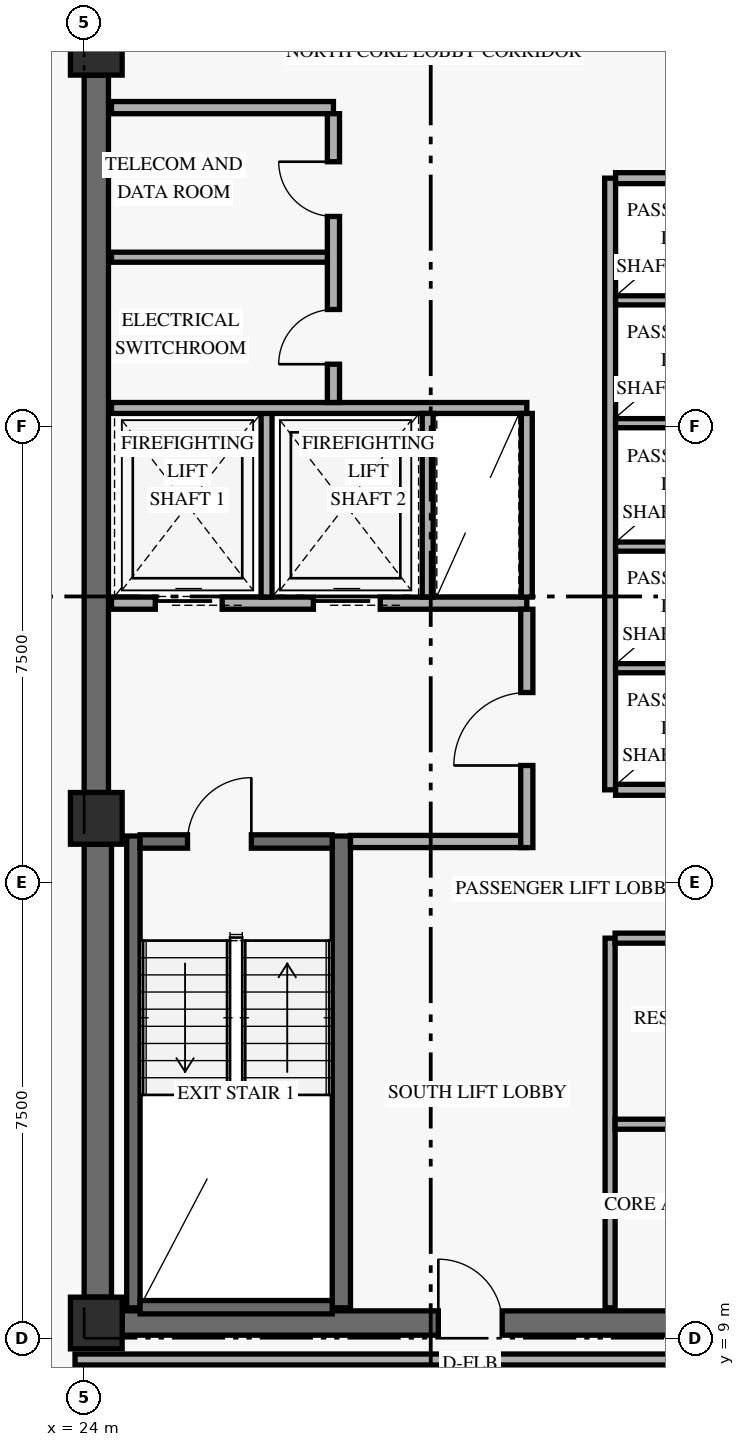
"""IFC4 building model, lengths in metres.
Left out: names, types, materials, properties, quantities, classifications, styles, units other than length and angle.
Written with IfcOpenShell. Run it as: python <this file> out.ifc"""

import sys

from ifc_helpers import new_model, si_unit, direction, frame, frame_2d, origin, origin_2d, place, context, subcontext, project, spatial, rectangle, extrude, element, fill, save


model = new_model("IFC4")
c1 = context("Model", 3, precision=1e-05, world=origin(), true_north=direction((0.0, 1.0)))
c2 = subcontext(c1, "Body", "Model", "MODEL_VIEW")
j1 = project(units=[si_unit("LENGTHUNIT", "METRE"), si_unit("PLANEANGLEUNIT", "RADIAN")], contexts=[c1])
p1 = place(None, origin())
s1 = spatial("IfcSite", under=j1, at=p1, CompositionType="ELEMENT")
p2 = place(p1, origin())
s2 = spatial("IfcBuilding", under=s1, at=p2, CompositionType="ELEMENT")
p3 = place(p2, frame((0.0, 0.0, 132.0)))
s3 = spatial("IfcBuildingStorey", under=s2, at=p3, CompositionType="ELEMENT", Elevation=132.0)
p4 = place(p3, frame((24.225, 9.675, 0.0), z_axis=(0.0, 0.0, 1.0), x_axis=(0.0, 1.0, 0.0)))
e1 = element("IfcWall", 1, at=p4, inside=s3, PredefinedType="SHEAR", context=c2, shape_type="SweptSolid", body=[
    extrude(rectangle(XDim=7.45, YDim=0.45, at=frame_2d((3.725, 0.0))), origin(), (0.0, 0.0, 1.0), 2.689),
])
p5 = place(p3, frame((24.2, 17.975, 0.0), z_axis=(0.0, 0.0, 1.0), x_axis=(0.0, 1.0, 0.0)))
e2 = element("IfcWall", 2, at=p5, inside=s3, PredefinedType="SHEAR", context=c2, shape_type="SweptSolid", body=[
    extrude(rectangle(XDim=11.8, YDim=0.4, at=frame_2d((5.9, 0.0))), origin(), (0.0, 0.0, 1.0), 2.689),
])
p6 = place(p3, frame((24.625, 9.25, 0.0), z_axis=(0.0, 0.0, 1.0), x_axis=(1.0, 0.0, 0.0)))
e3 = element("IfcWall", 3, at=p6, inside=s3, PredefinedType="SHEAR", context=c2, shape_type="SweptSolid", body=[
    extrude(rectangle(XDim=10.15, YDim=0.4, at=frame_2d((5.075, 0.0))), origin(), (0.0, 0.0, 1.0), 3.3),
])
p7 = place(p6, frame((5.2, 0.0, 0.0)))
e4 = element("IfcOpeningElement", 4, at=p7, cuts=e3, PredefinedType="OPENING", context=c2, shape_type="SweptSolid", body=[
    extrude(rectangle(XDim=1.05, YDim=2.15, at=frame_2d((0.525, 1.075))), frame((0.0, 0.21, 0.0), z_axis=(0.0, -1.0, 0.0), x_axis=(1.0, 0.0, 0.0)), (0.0, 0.0, 1.0), 0.42),
])
p8 = place(p3, frame((24.81, 9.5, 0.0), z_axis=(0.0, 0.0, 1.0), x_axis=(0.0, 1.0, 0.0)))
e5 = element("IfcWall", 5, at=p8, inside=s3, PredefinedType="SHEAR", context=c2, shape_type="SweptSolid", body=[
    extrude(rectangle(XDim=7.76, YDim=0.22, at=frame_2d((3.88, 0.0))), origin(), (0.0, 0.0, 1.0), 3.3),
])
p9 = place(p3, frame((28.23, 9.5, 0.0), z_axis=(0.0, 0.0, 1.0), x_axis=(0.0, 1.0, 0.0)))
e6 = element("IfcWall", 6, at=p9, inside=s3, PredefinedType="SHEAR", context=c2, shape_type="SweptSolid", body=[
    extrude(rectangle(XDim=7.76, YDim=0.3, at=frame_2d((3.88, 0.0))), origin(), (0.0, 0.0, 1.0), 3.3),
])
p10 = place(p3, frame((24.92, 9.51, 0.0), z_axis=(0.0, 0.0, 1.0), x_axis=(1.0, 0.0, 0.0)))
e7 = element("IfcWall", 7, at=p10, inside=s3, PredefinedType="SHEAR", context=c2, shape_type="SweptSolid", body=[
    extrude(rectangle(XDim=3.16, YDim=0.22, at=frame_2d((1.58, 0.0))), origin(), (0.0, 0.0, 1.0), 3.3),
])
p11 = place(p3, frame((24.92, 17.17, 0.0), z_axis=(0.0, 0.0, 1.0), x_axis=(1.0, 0.0, 0.0)))
e8 = element("IfcWall", 8, at=p11, inside=s3, PredefinedType="SHEAR", context=c2, shape_type="SweptSolid", body=[
    extrude(rectangle(XDim=3.16, YDim=0.22, at=frame_2d((1.58, 0.0))), origin(), (0.0, 0.0, 1.0), 3.3),
])
p12 = place(p11, frame((0.78, 0.0, 0.0)))
e9 = element("IfcOpeningElement", 9, at=p12, cuts=e8, PredefinedType="OPENING", context=c2, shape_type="SweptSolid", body=[
    extrude(rectangle(XDim=1.05, YDim=2.15, at=frame_2d((0.525, 1.075))), frame((0.0, 0.12, 0.0), z_axis=(0.0, -1.0, 0.0), x_axis=(1.0, 0.0, 0.0)), (0.0, 0.0, 1.0), 0.24),
])
for number, where, z_axis, x_axis in (
    (10, (24.2, 9.25, 0.0), (0.0, 0.0, 1.0), (1.0, 0.0, 0.0)),
    (11, (24.2, 17.55, 0.0), (0.0, 0.0, 1.0), (1.0, 0.0, 0.0)),
    (12, (24.2, 30.2, 0.0), (0.0, 0.0, 1.0), (1.0, 0.0, 0.0)),
):
    element("IfcColumn", number, at=place(p3, frame(where, z_axis=z_axis, x_axis=x_axis)), inside=s3, PredefinedType="COLUMN", context=c2, shape_type="SweptSolid", body=[
        extrude(rectangle(XDim=0.85, YDim=0.85, at=origin_2d()), origin(), (0.0, 0.0, 1.0), 3.6),
    ])
p13 = place(p3, frame((24.45, 21.09, 0.0), z_axis=(0.0, 0.0, 1.0), x_axis=(1.0, 0.0, 0.0)))
e13 = element("IfcWall", 13, at=p13, inside=s3, PredefinedType="STANDARD", context=c2, shape_type="SweptSolid", body=[
    extrude(rectangle(XDim=6.83, YDim=0.2, at=frame_2d((3.415, 0.0))), origin(), (0.0, 0.0, 1.0), 3.3),
])
p14 = place(p13, frame((0.72, 0.0, 0.0)))
e14 = element("IfcOpeningElement", 14, at=p14, cuts=e13, PredefinedType="OPENING", context=c2, shape_type="SweptSolid", body=[
    extrude(rectangle(XDim=1.1, YDim=2.2, at=frame_2d((0.55, 1.1))), frame((0.0, 0.11, 0.0), z_axis=(0.0, -1.0, 0.0), x_axis=(1.0, 0.0, 0.0)), (0.0, 0.0, 1.0), 0.22),
])
p15 = place(p13, frame((3.32, 0.0, 0.0)))
e15 = element("IfcOpeningElement", 15, at=p15, cuts=e13, PredefinedType="OPENING", context=c2, shape_type="SweptSolid", body=[
    extrude(rectangle(XDim=1.1, YDim=2.2, at=frame_2d((0.55, 1.1))), frame((0.0, 0.11, 0.0), z_axis=(0.0, -1.0, 0.0), x_axis=(1.0, 0.0, 0.0)), (0.0, 0.0, 1.0), 0.22),
])
p16 = place(p3, frame((28.38, 17.17, 0.0), z_axis=(0.0, 0.0, 1.0), x_axis=(1.0, 0.0, 0.0)))
e16 = element("IfcWall", 16, at=p16, inside=s3, PredefinedType="STANDARD", context=c2, shape_type="SweptSolid", body=[
    extrude(rectangle(XDim=2.9, YDim=0.2, at=frame_2d((1.45, 0.0))), origin(), (0.0, 0.0, 1.0), 3.3),
])
p17 = place(p3, frame((31.28, 17.07, 0.0), z_axis=(0.0, 0.0, 1.0), x_axis=(0.0, 1.0, 0.0)))
e17 = element("IfcWall", 17, at=p17, inside=s3, PredefinedType="STANDARD", context=c2, shape_type="SweptSolid", body=[
    extrude(rectangle(XDim=3.92, YDim=0.2, at=frame_2d((1.96, 0.0))), origin(), (0.0, 0.0, 1.0), 2.671),
])
p18 = place(p17, frame((1.35, 0.0, 0.0)))
e18 = element("IfcOpeningElement", 18, at=p18, cuts=e17, PredefinedType="OPENING", context=c2, shape_type="SweptSolid", body=[
    extrude(rectangle(XDim=1.2, YDim=2.15, at=frame_2d((0.6, 1.075))), frame((0.0, 0.11, 0.0), z_axis=(0.0, -1.0, 0.0), x_axis=(1.0, 0.0, 0.0)), (0.0, 0.0, 1.0), 0.22),
])
p19 = place(p3, frame((27.0, 21.19, 0.0), z_axis=(0.0, 0.0, 1.0), x_axis=(0.0, 1.0, 0.0)))
e19 = element("IfcWall", 19, at=p19, inside=s3, PredefinedType="STANDARD", context=c2, shape_type="SweptSolid", body=[
    extrude(rectangle(XDim=3.11, YDim=0.18, at=frame_2d((1.555, 0.0))), origin(), (0.0, 0.0, 1.0), 3.3),
])
p20 = place(p3, frame((24.45, 24.3, 0.0), z_axis=(0.0, 0.0, 1.0), x_axis=(1.0, 0.0, 0.0)))
e20 = element("IfcWall", 20, at=p20, inside=s3, PredefinedType="STANDARD", context=c2, shape_type="SweptSolid", body=[
    extrude(rectangle(XDim=6.83, YDim=0.18, at=frame_2d((3.415, 0.0))), origin(), (0.0, 0.0, 1.0), 3.3),
])
for number, where, z_axis, x_axis in (
    (21, (29.65, 21.19, 0.0), (0.0, 0.0, 1.0), (0.0, 1.0, 0.0)),
    (22, (31.28, 21.19, 0.0), (0.0, 0.0, 1.0), (0.0, 1.0, 0.0)),
):
    element("IfcWall", number, at=place(p3, frame(where, z_axis=z_axis, x_axis=x_axis)), inside=s3, PredefinedType="STANDARD", context=c2, shape_type="SweptSolid", body=[
        extrude(rectangle(XDim=3.02, YDim=0.18, at=frame_2d((1.51, 0.0))), origin(), (0.0, 0.0, 1.0), 3.3),
    ])
p21 = place(p3, frame((24.45, 29.24, 0.0), z_axis=(0.0, 0.0, 1.0), x_axis=(1.0, 0.0, 0.0)))
e23 = element("IfcWall", 23, at=p21, inside=s3, PredefinedType="STANDARD", context=c2, shape_type="SweptSolid", body=[
    extrude(rectangle(XDim=3.65, YDim=0.2, at=frame_2d((1.825, 0.0))), origin(), (0.0, 0.0, 1.0), 3.3),
])
p22 = place(p3, frame((28.1, 24.39, 0.0), z_axis=(0.0, 0.0, 1.0), x_axis=(0.0, 1.0, 0.0)))
e24 = element("IfcWall", 24, at=p22, inside=s3, PredefinedType="STANDARD", context=c2, shape_type="SweptSolid", body=[
    extrude(rectangle(XDim=4.75, YDim=0.2, at=frame_2d((2.375, 0.0))), origin(), (0.0, 0.0, 1.0), 3.3),
])
p23 = place(p22, frame((0.63, 0.0, 0.0)))
e25 = element("IfcOpeningElement", 25, at=p23, cuts=e24, PredefinedType="OPENING", context=c2, shape_type="SweptSolid", body=[
    extrude(rectangle(XDim=0.9, YDim=2.1, at=frame_2d((0.45, 1.05))), frame((0.0, 0.11, 0.0), z_axis=(0.0, -1.0, 0.0), x_axis=(1.0, 0.0, 0.0)), (0.0, 0.0, 1.0), 0.22),
])
p24 = place(p22, frame((3.06, 0.0, 0.0)))
e26 = element("IfcOpeningElement", 26, at=p24, cuts=e24, PredefinedType="OPENING", context=c2, shape_type="SweptSolid", body=[
    extrude(rectangle(XDim=0.9, YDim=2.1, at=frame_2d((0.45, 1.05))), frame((0.0, 0.11, 0.0), z_axis=(0.0, -1.0, 0.0), x_axis=(1.0, 0.0, 0.0)), (0.0, 0.0, 1.0), 0.22),
])
p25 = place(p3, frame((24.45, 26.78, 0.0), z_axis=(0.0, 0.0, 1.0), x_axis=(1.0, 0.0, 0.0)))
e27 = element("IfcWall", 27, at=p25, inside=s3, PredefinedType="PARTITIONING", context=c2, shape_type="SweptSolid", body=[
    extrude(rectangle(XDim=3.55, YDim=0.165, at=frame_2d((1.775, 0.0))), origin(), (0.0, 0.0, 1.0), 3.3),
])
p26 = place(p3, frame((32.65, 18.02, 0.0), z_axis=(0.0, 0.0, 1.0), x_axis=(0.0, 1.0, 0.0)))
e28 = element("IfcWall", 28, at=p26, inside=s3, PredefinedType="STANDARD", context=c2, shape_type="SweptSolid", body=[
    extrude(rectangle(XDim=10.06, YDim=0.18, at=frame_2d((5.03, 0.0))), origin(), (0.0, 0.0, 1.0), 3.3),
])
for number, where, z_axis, x_axis in (
    (29, (32.74, 18.02, 0.0), (0.0, 0.0, 1.0), (1.0, 0.0, 0.0)),
    (30, (32.74, 28.08, 0.0), (0.0, 0.0, 1.0), (1.0, 0.0, 0.0)),
):
    element("IfcWall", number, at=place(p3, frame(where, z_axis=z_axis, x_axis=x_axis)), inside=s3, PredefinedType="STANDARD", context=c2, shape_type="SweptSolid", body=[
        extrude(rectangle(XDim=2.26, YDim=0.18, at=frame_2d((1.13, 0.0))), origin(), (0.0, 0.0, 1.0), 3.3),
    ])
for number, where, z_axis, x_axis in (
    (31, (32.74, 20.02, 0.0), (0.0, 0.0, 1.0), (1.0, 0.0, 0.0)),
    (32, (32.74, 22.02, 0.0), (0.0, 0.0, 1.0), (1.0, 0.0, 0.0)),
    (33, (32.74, 24.05, 0.0), (0.0, 0.0, 1.0), (1.0, 0.0, 0.0)),
    (34, (32.74, 26.07, 0.0), (0.0, 0.0, 1.0), (1.0, 0.0, 0.0)),
):
    element("IfcWall", number, at=place(p3, frame(where, z_axis=z_axis, x_axis=x_axis)), inside=s3, PredefinedType="STANDARD", context=c2, shape_type="SweptSolid", body=[
        extrude(rectangle(XDim=2.26, YDim=0.15, at=frame_2d((1.13, 0.0))), origin(), (0.0, 0.0, 1.0), 3.3),
    ])
p27 = place(p3, frame((32.65, 9.5, 0.0), z_axis=(0.0, 0.0, 1.0), x_axis=(0.0, 1.0, 0.0)))
e35 = element("IfcWall", 35, at=p27, inside=s3, PredefinedType="PARTITIONING", context=c2, shape_type="SweptSolid", body=[
    extrude(rectangle(XDim=6.08, YDim=0.165, at=frame_2d((3.04, 0.0))), origin(), (0.0, 0.0, 1.0), 3.3),
])
p28 = place(p3, frame((32.732, 15.58, 0.0), z_axis=(0.0, 0.0, 1.0), x_axis=(1.0, 0.0, 0.0)))
e36 = element("IfcWall", 36, at=p28, inside=s3, PredefinedType="PARTITIONING", context=c2, shape_type="SweptSolid", body=[
    extrude(rectangle(XDim=4.818, YDim=0.165, at=frame_2d((2.409, 0.0))), origin(), (0.0, 0.0, 1.0), 2.671),
])
p29 = place(p28, frame((2.867, 0.0, 0.0)))
e37 = element("IfcOpeningElement", 37, at=p29, cuts=e36, PredefinedType="OPENING", context=c2, shape_type="SweptSolid", body=[
    extrude(rectangle(XDim=0.95, YDim=2.15, at=frame_2d((0.475, 1.075))), frame((0.0, 0.093, 0.0), z_axis=(0.0, -1.0, 0.0), x_axis=(1.0, 0.0, 0.0)), (0.0, 0.0, 1.0), 0.185),
])
p30 = place(p3, frame((32.732, 12.52, 0.0), z_axis=(0.0, 0.0, 1.0), x_axis=(1.0, 0.0, 0.0)))
e38 = element("IfcWall", 38, at=p30, inside=s3, PredefinedType="PARTITIONING", context=c2, shape_type="SweptSolid", body=[
    extrude(rectangle(XDim=4.735, YDim=0.165, at=frame_2d((2.368, 0.0))), origin(), (0.0, 0.0, 1.0), 2.671),
])
p31 = place(p30, frame((2.768, 0.0, 0.0)))
e39 = element("IfcOpeningElement", 39, at=p31, cuts=e38, PredefinedType="OPENING", context=c2, shape_type="SweptSolid", body=[
    extrude(rectangle(XDim=0.9, YDim=2.1, at=frame_2d((0.45, 1.05))), frame((0.0, 0.093, 0.0), z_axis=(0.0, -1.0, 0.0), x_axis=(1.0, 0.0, 0.0)), (0.0, 0.0, 1.0), 0.185),
])
p32 = place(p3, frame((23.85, 8.65, 0.0), z_axis=(0.0, 0.0, 1.0), x_axis=(1.0, 0.0, 0.0)))
e40 = element("IfcWall", 40, at=p32, inside=s3, PredefinedType="STANDARD", context=c2, shape_type="SweptSolid", body=[
    extrude(rectangle(XDim=11.57, YDim=0.18, at=frame_2d((5.785, 0.0))), origin(), (0.0, 0.0, 1.0), 2.671),
])
p33 = place(p12, frame((1.05, 0.0, 0.0), z_axis=(0.0, 0.0, 1.0), x_axis=(-1.0, 0.0, 0.0)))
e41 = element("IfcDoor", 41, at=p33, inside=s3, OperationType="SINGLE_SWING_LEFT", PredefinedType="DOOR", context=c2, shape_type="SweptSolid", body=[
    extrude(rectangle(XDim=1.05, YDim=2.15, at=frame_2d((0.525, 1.075))), frame((0.0, 0.025, 0.0), z_axis=(0.0, -1.0, 0.0), x_axis=(1.0, 0.0, 0.0)), (0.0, 0.0, 1.0), 0.05),
])
fill(e9, e41)
p34 = place(p14, origin())
e42 = element("IfcDoor", 42, at=p34, inside=s3, OperationType="SLIDING_TO_LEFT", PredefinedType="DOOR", context=c2, shape_type="SweptSolid", body=[
    extrude(rectangle(XDim=1.1, YDim=2.2, at=frame_2d((0.55, 1.1))), frame((0.0, 0.025, 0.0), z_axis=(0.0, -1.0, 0.0), x_axis=(1.0, 0.0, 0.0)), (0.0, 0.0, 1.0), 0.05),
])
fill(e14, e42)
p35 = place(p15, origin())
e43 = element("IfcDoor", 43, at=p35, inside=s3, OperationType="SLIDING_TO_LEFT", PredefinedType="DOOR", context=c2, shape_type="SweptSolid", body=[
    extrude(rectangle(XDim=1.1, YDim=2.2, at=frame_2d((0.55, 1.1))), frame((0.0, 0.025, 0.0), z_axis=(0.0, -1.0, 0.0), x_axis=(1.0, 0.0, 0.0)), (0.0, 0.0, 1.0), 0.05),
])
fill(e15, e43)
p36 = place(p18, origin())
e44 = element("IfcDoor", 44, at=p36, inside=s3, OperationType="SINGLE_SWING_LEFT", PredefinedType="DOOR", context=c2, shape_type="SweptSolid", body=[
    extrude(rectangle(XDim=1.2, YDim=2.15, at=frame_2d((0.6, 1.075))), frame((0.0, 0.025, 0.0), z_axis=(0.0, -1.0, 0.0), x_axis=(1.0, 0.0, 0.0)), (0.0, 0.0, 1.0), 0.05),
])
fill(e18, e44)
p37 = place(p23, origin())
e45 = element("IfcDoor", 45, at=p37, inside=s3, OperationType="SINGLE_SWING_LEFT", PredefinedType="DOOR", context=c2, shape_type="SweptSolid", body=[
    extrude(rectangle(XDim=0.9, YDim=2.1, at=frame_2d((0.45, 1.05))), frame((0.0, 0.025, 0.0), z_axis=(0.0, -1.0, 0.0), x_axis=(1.0, 0.0, 0.0)), (0.0, 0.0, 1.0), 0.05),
])
fill(e25, e45)
p38 = place(p24, origin())
e46 = element("IfcDoor", 46, at=p38, inside=s3, OperationType="SINGLE_SWING_RIGHT", PredefinedType="DOOR", context=c2, shape_type="SweptSolid", body=[
    extrude(rectangle(XDim=0.9, YDim=2.1, at=frame_2d((0.45, 1.05))), frame((0.0, 0.025, 0.0), z_axis=(0.0, -1.0, 0.0), x_axis=(1.0, 0.0, 0.0)), (0.0, 0.0, 1.0), 0.05),
])
fill(e26, e46)
p39 = place(p7, origin())
e47 = element("IfcDoor", 47, at=p39, inside=s3, OperationType="SINGLE_SWING_LEFT", PredefinedType="DOOR", context=c2, shape_type="SweptSolid", body=[
    extrude(rectangle(XDim=1.05, YDim=2.15, at=frame_2d((0.525, 1.075))), frame((0.0, 0.025, 0.0), z_axis=(0.0, -1.0, 0.0), x_axis=(1.0, 0.0, 0.0)), (0.0, 0.0, 1.0), 0.05),
])
fill(e4, e47)
save(model, sys.argv[1])
